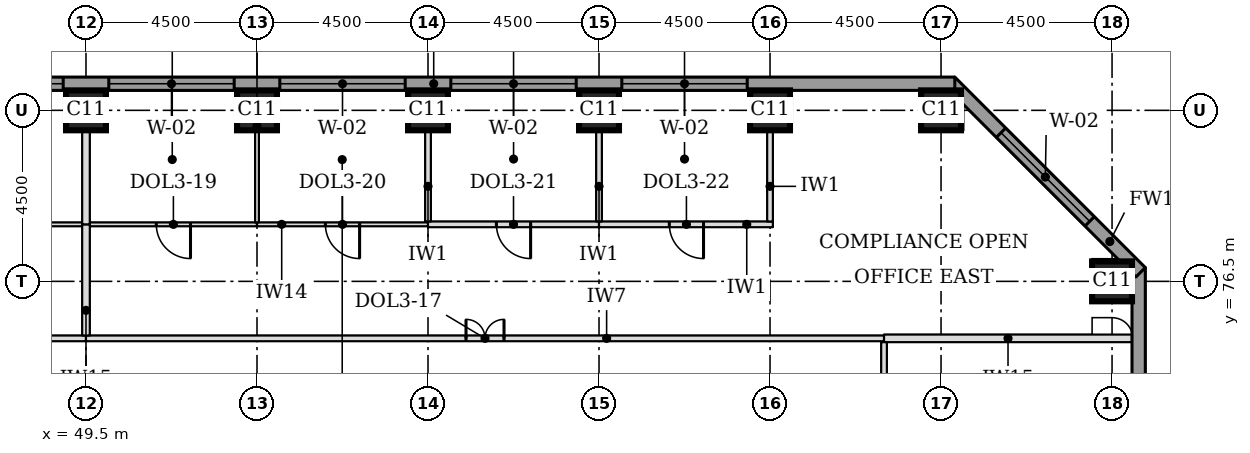
"""IFC4 building model, lengths in metres.
Left out: names, types, materials, properties, quantities, classifications, styles, units other than length and angle.
Written with IfcOpenShell. Run it as: python <this file> out.ifc"""

import sys

from ifc_helpers import new_model, si_unit, direction, frame, frame_2d, origin, origin_2d, place, context, subcontext, project, spatial, rectangle, extrude, element, fill, save


model = new_model("IFC4")
c1 = context("Model", 3, precision=1e-05, world=origin(), true_north=direction((0.0, 1.0)))
c2 = subcontext(c1, "Body", "Model", "MODEL_VIEW")
j1 = project(units=[si_unit("LENGTHUNIT", "METRE"), si_unit("PLANEANGLEUNIT", "RADIAN")], contexts=[c1])
p1 = place(None, origin())
s1 = spatial("IfcSite", under=j1, at=p1, CompositionType="ELEMENT")
p2 = place(p1, origin())
s2 = spatial("IfcBuilding", under=s1, at=p2, CompositionType="ELEMENT")
p3 = place(p2, frame((0.0, 0.0, 93.7)))
s3 = spatial("IfcBuildingStorey", under=s2, at=p3, CompositionType="ELEMENT", Elevation=93.7)
for number, where, z_axis, x_axis in (
    (1, (76.5, 76.5, 0.0), (0.0, 0.0, 1.0), (1.0, 0.0, 0.0)),
    (2, (49.5, 81.0, 0.0), (0.0, 0.0, 1.0), (1.0, 0.0, 0.0)),
    (3, (54.0, 81.0, 0.0), (0.0, 0.0, 1.0), (1.0, 0.0, 0.0)),
    (4, (58.5, 81.0, 0.0), (0.0, 0.0, 1.0), (1.0, 0.0, 0.0)),
    (5, (63.0, 81.0, 0.0), (0.0, 0.0, 1.0), (1.0, 0.0, 0.0)),
    (6, (67.5, 81.0, 0.0), (0.0, 0.0, 1.0), (1.0, 0.0, 0.0)),
    (7, (72.0, 81.0, 0.0), (0.0, 0.0, 1.0), (1.0, 0.0, 0.0)),
):
    element("IfcColumn", number, at=place(p3, frame(where, z_axis=z_axis, x_axis=x_axis)), inside=s3, PredefinedType="COLUMN", context=c2, shape_type="SweptSolid", body=[
        extrude(rectangle(XDim=1.05, YDim=1.05, at=origin_2d()), origin(), (0.0, 0.0, 1.0), 3.7),
    ])
p4 = place(p3, frame((77.2, 44.638, 0.0), z_axis=(0.0, 0.0, 1.0), x_axis=(0.0, 1.0, 0.0)))
e8 = element("IfcWall", 8, at=p4, inside=s3, PredefinedType="STANDARD", context=c2, shape_type="SweptSolid", body=[
    extrude(rectangle(XDim=32.225, YDim=0.35, at=frame_2d((16.112, 0.0))), origin(), (0.0, 0.0, 1.0), 3.525),
])
p5 = place(p4, frame((5.462, 0.0, 0.9)))
e9 = element("IfcOpeningElement", 9, at=p5, cuts=e8, PredefinedType="OPENING", context=c2, shape_type="SweptSolid", body=[
    extrude(rectangle(XDim=3.3, YDim=1.9, at=frame_2d((1.65, 0.95))), frame((0.0, 0.185, 0.0), z_axis=(0.0, -1.0, 0.0), x_axis=(1.0, 0.0, 0.0)), (0.0, 0.0, 1.0), 0.37),
])
p6 = place(p4, frame((9.962, 0.0, 0.9)))
e10 = element("IfcOpeningElement", 10, at=p6, cuts=e8, PredefinedType="OPENING", context=c2, shape_type="SweptSolid", body=[
    extrude(rectangle(XDim=3.3, YDim=1.9, at=frame_2d((1.65, 0.95))), frame((0.0, 0.185, 0.0), z_axis=(0.0, -1.0, 0.0), x_axis=(1.0, 0.0, 0.0)), (0.0, 0.0, 1.0), 0.37),
])
p7 = place(p4, frame((14.462, 0.0, 0.9)))
e11 = element("IfcOpeningElement", 11, at=p7, cuts=e8, PredefinedType="OPENING", context=c2, shape_type="SweptSolid", body=[
    extrude(rectangle(XDim=3.3, YDim=1.9, at=frame_2d((1.65, 0.95))), frame((0.0, 0.185, 0.0), z_axis=(0.0, -1.0, 0.0), x_axis=(1.0, 0.0, 0.0)), (0.0, 0.0, 1.0), 0.37),
])
p8 = place(p4, frame((18.962, 0.0, 0.9)))
e12 = element("IfcOpeningElement", 12, at=p8, cuts=e8, PredefinedType="OPENING", context=c2, shape_type="SweptSolid", body=[
    extrude(rectangle(XDim=3.3, YDim=1.9, at=frame_2d((1.65, 0.95))), frame((0.0, 0.185, 0.0), z_axis=(0.0, -1.0, 0.0), x_axis=(1.0, 0.0, 0.0)), (0.0, 0.0, 1.0), 0.37),
])
p9 = place(p4, frame((23.462, 0.0, 0.9)))
e13 = element("IfcOpeningElement", 13, at=p9, cuts=e8, PredefinedType="OPENING", context=c2, shape_type="SweptSolid", body=[
    extrude(rectangle(XDim=3.3, YDim=1.9, at=frame_2d((1.65, 0.95))), frame((0.0, 0.185, 0.0), z_axis=(0.0, -1.0, 0.0), x_axis=(1.0, 0.0, 0.0)), (0.0, 0.0, 1.0), 0.37),
])
p10 = place(p3, frame((77.251, 76.739, 0.0), z_axis=(0.0, 0.0, 1.0), x_axis=(-0.707106781187, 0.707106781187, 0.0)))
e14 = element("IfcWall", 14, at=p10, inside=s3, PredefinedType="STANDARD", context=c2, shape_type="SweptSolid", body=[
    extrude(rectangle(XDim=7.089, YDim=0.35, at=frame_2d((3.544, 0.0))), origin(), (0.0, 0.0, 1.0), 3.525),
])
p11 = place(p10, frame((1.894, 0.0, 0.9)))
e15 = element("IfcOpeningElement", 15, at=p11, cuts=e14, PredefinedType="OPENING", context=c2, shape_type="SweptSolid", body=[
    extrude(rectangle(XDim=3.3, YDim=1.9, at=frame_2d((1.65, 0.95))), frame((0.0, 0.185, 0.0), z_axis=(0.0, -1.0, 0.0), x_axis=(1.0, 0.0, 0.0)), (0.0, 0.0, 1.0), 0.37),
])
p12 = place(p3, frame((72.362, 81.7, 0.0), z_axis=(0.0, 0.0, 1.0), x_axis=(-1.0, 0.0, 0.0)))
e16 = element("IfcWall", 16, at=p12, inside=s3, PredefinedType="STANDARD", context=c2, shape_type="SweptSolid", body=[
    extrude(rectangle(XDim=32.225, YDim=0.35, at=frame_2d((16.112, 0.0))), origin(), (0.0, 0.0, 1.0), 3.525),
])
p13 = place(p12, frame((5.462, 0.0, 0.9)))
e17 = element("IfcOpeningElement", 17, at=p13, cuts=e16, PredefinedType="OPENING", context=c2, shape_type="SweptSolid", body=[
    extrude(rectangle(XDim=3.3, YDim=1.9, at=frame_2d((1.65, 0.95))), frame((0.0, 0.185, 0.0), z_axis=(0.0, -1.0, 0.0), x_axis=(1.0, 0.0, 0.0)), (0.0, 0.0, 1.0), 0.37),
])
p14 = place(p12, frame((9.962, 0.0, 0.9)))
e18 = element("IfcOpeningElement", 18, at=p14, cuts=e16, PredefinedType="OPENING", context=c2, shape_type="SweptSolid", body=[
    extrude(rectangle(XDim=3.3, YDim=1.9, at=frame_2d((1.65, 0.95))), frame((0.0, 0.185, 0.0), z_axis=(0.0, -1.0, 0.0), x_axis=(1.0, 0.0, 0.0)), (0.0, 0.0, 1.0), 0.37),
])
p15 = place(p12, frame((14.462, 0.0, 0.9)))
e19 = element("IfcOpeningElement", 19, at=p15, cuts=e16, PredefinedType="OPENING", context=c2, shape_type="SweptSolid", body=[
    extrude(rectangle(XDim=3.3, YDim=1.9, at=frame_2d((1.65, 0.95))), frame((0.0, 0.185, 0.0), z_axis=(0.0, -1.0, 0.0), x_axis=(1.0, 0.0, 0.0)), (0.0, 0.0, 1.0), 0.37),
])
p16 = place(p12, frame((18.962, 0.0, 0.9)))
e20 = element("IfcOpeningElement", 20, at=p16, cuts=e16, PredefinedType="OPENING", context=c2, shape_type="SweptSolid", body=[
    extrude(rectangle(XDim=3.3, YDim=1.9, at=frame_2d((1.65, 0.95))), frame((0.0, 0.185, 0.0), z_axis=(0.0, -1.0, 0.0), x_axis=(1.0, 0.0, 0.0)), (0.0, 0.0, 1.0), 0.37),
])
p17 = place(p12, frame((23.462, 0.0, 0.9)))
e21 = element("IfcOpeningElement", 21, at=p17, cuts=e16, PredefinedType="OPENING", context=c2, shape_type="SweptSolid", body=[
    extrude(rectangle(XDim=3.3, YDim=1.9, at=frame_2d((1.65, 0.95))), frame((0.0, 0.185, 0.0), z_axis=(0.0, -1.0, 0.0), x_axis=(1.0, 0.0, 0.0)), (0.0, 0.0, 1.0), 0.37),
])
p18 = place(p3, frame((42.075, 75.0, 0.0), z_axis=(0.0, 0.0, 1.0), x_axis=(1.0, 0.0, 0.0)))
e22 = element("IfcWall", 22, at=p18, inside=s3, PredefinedType="PARTITIONING", context=c2, shape_type="SweptSolid", body=[
    extrude(rectangle(XDim=7.425, YDim=0.15, at=frame_2d((3.712, 0.0))), origin(), (0.0, 0.0, 1.0), 3.55),
])
p19 = place(p18, frame((3.2, 0.0, 0.0)))
e23 = element("IfcOpeningElement", 23, at=p19, cuts=e22, PredefinedType="OPENING", context=c2, shape_type="SweptSolid", body=[
    extrude(rectangle(XDim=1.0, YDim=2.1, at=frame_2d((0.5, 1.05))), frame((0.0, 0.085, 0.0), z_axis=(0.0, -1.0, 0.0), x_axis=(1.0, 0.0, 0.0)), (0.0, 0.0, 1.0), 0.17),
])
p20 = place(p3, frame((49.5, 75.0, 0.0), z_axis=(0.0, 0.0, 1.0), x_axis=(1.0, 0.0, 0.0)))
e24 = element("IfcWall", 24, at=p20, inside=s3, PredefinedType="PARTITIONING", context=c2, shape_type="SweptSolid", body=[
    extrude(rectangle(XDim=21.0, YDim=0.15, at=frame_2d((10.5, 0.0))), origin(), (0.0, 0.0, 1.0), 3.55),
])
p21 = place(p20, frame((10.0, 0.0, 0.0)))
e25 = element("IfcOpeningElement", 25, at=p21, cuts=e24, PredefinedType="OPENING", context=c2, shape_type="SweptSolid", body=[
    extrude(rectangle(XDim=1.0, YDim=2.1, at=frame_2d((0.5, 1.05))), frame((0.0, 0.085, 0.0), z_axis=(0.0, -1.0, 0.0), x_axis=(1.0, 0.0, 0.0)), (0.0, 0.0, 1.0), 0.17),
])
p22 = place(p3, frame((70.5, 75.0, 0.0), z_axis=(0.0, 0.0, 1.0), x_axis=(1.0, 0.0, 0.0)))
e26 = element("IfcWall", 26, at=p22, inside=s3, PredefinedType="PARTITIONING", context=c2, shape_type="SweptSolid", body=[
    extrude(rectangle(XDim=6.525, YDim=0.2, at=frame_2d((3.262, 0.0))), origin(), (0.0, 0.0, 1.0), 3.55),
])
p23 = place(p3, frame((45.0, 78.0, 0.0), z_axis=(0.0, 0.0, 1.0), x_axis=(1.0, 0.0, 0.0)))
e27 = element("IfcWall", 27, at=p23, inside=s3, PredefinedType="PARTITIONING", context=c2, shape_type="SweptSolid", body=[
    extrude(rectangle(XDim=4.4, YDim=0.1, at=frame_2d((2.2, 0.0))), origin(), (0.0, 0.0, 1.0), 3.55),
])
p24 = place(p3, frame((49.6, 78.0, 0.0), z_axis=(0.0, 0.0, 1.0), x_axis=(1.0, 0.0, 0.0)))
e28 = element("IfcWall", 28, at=p24, inside=s3, PredefinedType="PARTITIONING", context=c2, shape_type="SweptSolid", body=[
    extrude(rectangle(XDim=4.4, YDim=0.1, at=frame_2d((2.2, 0.0))), origin(), (0.0, 0.0, 1.0), 3.55),
])
p25 = place(p24, frame((1.75, 0.0, 0.0)))
e29 = element("IfcOpeningElement", 29, at=p25, cuts=e28, PredefinedType="OPENING", context=c2, shape_type="SweptSolid", body=[
    extrude(rectangle(XDim=0.9, YDim=2.1, at=frame_2d((0.45, 1.05))), frame((0.0, 0.06, 0.0), z_axis=(0.0, -1.0, 0.0), x_axis=(1.0, 0.0, 0.0)), (0.0, 0.0, 1.0), 0.12),
])
p26 = place(p3, frame((54.0, 78.0, 0.0), z_axis=(0.0, 0.0, 1.0), x_axis=(1.0, 0.0, 0.0)))
e30 = element("IfcWall", 30, at=p26, inside=s3, PredefinedType="PARTITIONING", context=c2, shape_type="SweptSolid", body=[
    extrude(rectangle(XDim=4.5, YDim=0.1, at=frame_2d((2.25, 0.0))), origin(), (0.0, 0.0, 1.0), 3.55),
])
p27 = place(p26, frame((1.8, 0.0, 0.0)))
e31 = element("IfcOpeningElement", 31, at=p27, cuts=e30, PredefinedType="OPENING", context=c2, shape_type="SweptSolid", body=[
    extrude(rectangle(XDim=0.9, YDim=2.1, at=frame_2d((0.45, 1.05))), frame((0.0, 0.06, 0.0), z_axis=(0.0, -1.0, 0.0), x_axis=(1.0, 0.0, 0.0)), (0.0, 0.0, 1.0), 0.12),
])
p28 = place(p3, frame((58.5, 78.0, 0.0), z_axis=(0.0, 0.0, 1.0), x_axis=(1.0, 0.0, 0.0)))
e32 = element("IfcWall", 32, at=p28, inside=s3, PredefinedType="PARTITIONING", context=c2, shape_type="SweptSolid", body=[
    extrude(rectangle(XDim=4.5, YDim=0.15, at=frame_2d((2.25, 0.0))), origin(), (0.0, 0.0, 1.0), 3.55),
])
p29 = place(p28, frame((1.8, 0.0, 0.0)))
e33 = element("IfcOpeningElement", 33, at=p29, cuts=e32, PredefinedType="OPENING", context=c2, shape_type="SweptSolid", body=[
    extrude(rectangle(XDim=0.9, YDim=2.1, at=frame_2d((0.45, 1.05))), frame((0.0, 0.085, 0.0), z_axis=(0.0, -1.0, 0.0), x_axis=(1.0, 0.0, 0.0)), (0.0, 0.0, 1.0), 0.17),
])
p30 = place(p3, frame((63.0, 78.0, 0.0), z_axis=(0.0, 0.0, 1.0), x_axis=(1.0, 0.0, 0.0)))
e34 = element("IfcWall", 34, at=p30, inside=s3, PredefinedType="PARTITIONING", context=c2, shape_type="SweptSolid", body=[
    extrude(rectangle(XDim=4.575, YDim=0.15, at=frame_2d((2.288, 0.0))), origin(), (0.0, 0.0, 1.0), 3.55),
])
p31 = place(p30, frame((1.85, 0.0, 0.0)))
e35 = element("IfcOpeningElement", 35, at=p31, cuts=e34, PredefinedType="OPENING", context=c2, shape_type="SweptSolid", body=[
    extrude(rectangle(XDim=0.9, YDim=2.1, at=frame_2d((0.45, 1.05))), frame((0.0, 0.085, 0.0), z_axis=(0.0, -1.0, 0.0), x_axis=(1.0, 0.0, 0.0)), (0.0, 0.0, 1.0), 0.17),
])
p32 = place(p3, frame((70.5, 61.5, 0.0), z_axis=(0.0, 0.0, 1.0), x_axis=(0.0, 1.0, 0.0)))
e36 = element("IfcWall", 36, at=p32, inside=s3, PredefinedType="PARTITIONING", context=c2, shape_type="SweptSolid", body=[
    extrude(rectangle(XDim=13.4, YDim=0.15, at=frame_2d((6.7, 0.0))), origin(), (0.0, 0.0, 1.0), 3.55),
])
p33 = place(p32, frame((6.2, 0.0, 0.0)))
e37 = element("IfcOpeningElement", 37, at=p33, cuts=e36, PredefinedType="OPENING", context=c2, shape_type="SweptSolid", body=[
    extrude(rectangle(XDim=1.0, YDim=2.1, at=frame_2d((0.5, 1.05))), frame((0.0, 0.085, 0.0), z_axis=(0.0, -1.0, 0.0), x_axis=(1.0, 0.0, 0.0)), (0.0, 0.0, 1.0), 0.17),
])
p34 = place(p3, frame((49.5, 75.075, 0.0), z_axis=(0.0, 0.0, 1.0), x_axis=(0.0, 1.0, 0.0)))
e38 = element("IfcWall", 38, at=p34, inside=s3, PredefinedType="PARTITIONING", context=c2, shape_type="SweptSolid", body=[
    extrude(rectangle(XDim=2.925, YDim=0.2, at=frame_2d((1.462, 0.0))), origin(), (0.0, 0.0, 1.0), 3.55),
])
p35 = place(p3, frame((49.5, 78.0, 0.0), z_axis=(0.0, 0.0, 1.0), x_axis=(0.0, 1.0, 0.0)))
e39 = element("IfcWall", 39, at=p35, inside=s3, PredefinedType="PARTITIONING", context=c2, shape_type="SweptSolid", body=[
    extrude(rectangle(XDim=3.525, YDim=0.2, at=frame_2d((1.762, 0.0))), origin(), (0.0, 0.0, 1.0), 3.55),
])
p36 = place(p3, frame((54.0, 78.05, 0.0), z_axis=(0.0, 0.0, 1.0), x_axis=(0.0, 1.0, 0.0)))
e40 = element("IfcWall", 40, at=p36, inside=s3, PredefinedType="PARTITIONING", context=c2, shape_type="SweptSolid", body=[
    extrude(rectangle(XDim=3.475, YDim=0.1, at=frame_2d((1.737, 0.0))), origin(), (0.0, 0.0, 1.0), 3.55),
])
for number, where, z_axis, x_axis in (
    (41, (58.5, 78.075, 0.0), (0.0, 0.0, 1.0), (0.0, 1.0, 0.0)),
    (42, (63.0, 78.075, 0.0), (0.0, 0.0, 1.0), (0.0, 1.0, 0.0)),
    (43, (67.5, 78.075, 0.0), (0.0, 0.0, 1.0), (0.0, 1.0, 0.0)),
):
    element("IfcWall", number, at=place(p3, frame(where, z_axis=z_axis, x_axis=x_axis)), inside=s3, PredefinedType="PARTITIONING", context=c2, shape_type="SweptSolid", body=[
        extrude(rectangle(XDim=3.45, YDim=0.15, at=frame_2d((1.725, 0.0))), origin(), (0.0, 0.0, 1.0), 3.55),
    ])
p37 = place(p11, origin())
e44 = element("IfcWindow", 44, at=p37, inside=s3, PartitioningType="SINGLE_PANEL", PredefinedType="WINDOW", context=c2, shape_type="SweptSolid", body=[
    extrude(rectangle(XDim=3.3, YDim=1.9, at=frame_2d((1.65, 0.95))), frame((0.0, 0.085, 0.0), z_axis=(0.0, -1.0, 0.0), x_axis=(1.0, 0.0, 0.0)), (0.0, 0.0, 1.0), 0.06),
])
fill(e15, e44)
p38 = place(p13, origin())
e45 = element("IfcWindow", 45, at=p38, inside=s3, PartitioningType="SINGLE_PANEL", PredefinedType="WINDOW", context=c2, shape_type="SweptSolid", body=[
    extrude(rectangle(XDim=3.3, YDim=1.9, at=frame_2d((1.65, 0.95))), frame((0.0, 0.085, 0.0), z_axis=(0.0, -1.0, 0.0), x_axis=(1.0, 0.0, 0.0)), (0.0, 0.0, 1.0), 0.06),
])
fill(e17, e45)
p39 = place(p14, origin())
e46 = element("IfcWindow", 46, at=p39, inside=s3, PartitioningType="SINGLE_PANEL", PredefinedType="WINDOW", context=c2, shape_type="SweptSolid", body=[
    extrude(rectangle(XDim=3.3, YDim=1.9, at=frame_2d((1.65, 0.95))), frame((0.0, 0.085, 0.0), z_axis=(0.0, -1.0, 0.0), x_axis=(1.0, 0.0, 0.0)), (0.0, 0.0, 1.0), 0.06),
])
fill(e18, e46)
p40 = place(p15, origin())
e47 = element("IfcWindow", 47, at=p40, inside=s3, PartitioningType="SINGLE_PANEL", PredefinedType="WINDOW", context=c2, shape_type="SweptSolid", body=[
    extrude(rectangle(XDim=3.3, YDim=1.9, at=frame_2d((1.65, 0.95))), frame((0.0, 0.085, 0.0), z_axis=(0.0, -1.0, 0.0), x_axis=(1.0, 0.0, 0.0)), (0.0, 0.0, 1.0), 0.06),
])
fill(e19, e47)
p41 = place(p16, origin())
e48 = element("IfcWindow", 48, at=p41, inside=s3, PartitioningType="SINGLE_PANEL", PredefinedType="WINDOW", context=c2, shape_type="SweptSolid", body=[
    extrude(rectangle(XDim=3.3, YDim=1.9, at=frame_2d((1.65, 0.95))), frame((0.0, 0.085, 0.0), z_axis=(0.0, -1.0, 0.0), x_axis=(1.0, 0.0, 0.0)), (0.0, 0.0, 1.0), 0.06),
])
fill(e20, e48)
p42 = place(p17, origin())
e49 = element("IfcWindow", 49, at=p42, inside=s3, PartitioningType="SINGLE_PANEL", PredefinedType="WINDOW", context=c2, shape_type="SweptSolid", body=[
    extrude(rectangle(XDim=3.3, YDim=1.9, at=frame_2d((1.65, 0.95))), frame((0.0, 0.085, 0.0), z_axis=(0.0, -1.0, 0.0), x_axis=(1.0, 0.0, 0.0)), (0.0, 0.0, 1.0), 0.06),
])
fill(e21, e49)
p43 = place(p21, origin())
e50 = element("IfcDoor", 50, at=p43, inside=s3, OperationType="DOUBLE_DOOR_SINGLE_SWING", PredefinedType="DOOR", context=c2, shape_type="SweptSolid", body=[
    extrude(rectangle(XDim=1.0, YDim=2.1, at=frame_2d((0.5, 1.05))), frame((0.0, 0.025, 0.0), z_axis=(0.0, -1.0, 0.0), x_axis=(1.0, 0.0, 0.0)), (0.0, 0.0, 1.0), 0.05),
])
fill(e25, e50)
p44 = place(p25, frame((0.9, 0.0, 0.0), z_axis=(0.0, 0.0, 1.0), x_axis=(-1.0, 0.0, 0.0)))
e51 = element("IfcDoor", 51, at=p44, inside=s3, OperationType="SINGLE_SWING_LEFT", PredefinedType="DOOR", context=c2, shape_type="SweptSolid", body=[
    extrude(rectangle(XDim=0.9, YDim=2.1, at=frame_2d((0.45, 1.05))), frame((0.0, 0.025, 0.0), z_axis=(0.0, -1.0, 0.0), x_axis=(1.0, 0.0, 0.0)), (0.0, 0.0, 1.0), 0.05),
])
fill(e29, e51)
p45 = place(p27, frame((0.9, 0.0, 0.0), z_axis=(0.0, 0.0, 1.0), x_axis=(-1.0, 0.0, 0.0)))
e52 = element("IfcDoor", 52, at=p45, inside=s3, OperationType="SINGLE_SWING_LEFT", PredefinedType="DOOR", context=c2, shape_type="SweptSolid", body=[
    extrude(rectangle(XDim=0.9, YDim=2.1, at=frame_2d((0.45, 1.05))), frame((0.0, 0.025, 0.0), z_axis=(0.0, -1.0, 0.0), x_axis=(1.0, 0.0, 0.0)), (0.0, 0.0, 1.0), 0.05),
])
fill(e31, e52)
p46 = place(p29, frame((0.9, 0.0, 0.0), z_axis=(0.0, 0.0, 1.0), x_axis=(-1.0, 0.0, 0.0)))
e53 = element("IfcDoor", 53, at=p46, inside=s3, OperationType="SINGLE_SWING_LEFT", PredefinedType="DOOR", context=c2, shape_type="SweptSolid", body=[
    extrude(rectangle(XDim=0.9, YDim=2.1, at=frame_2d((0.45, 1.05))), frame((0.0, 0.025, 0.0), z_axis=(0.0, -1.0, 0.0), x_axis=(1.0, 0.0, 0.0)), (0.0, 0.0, 1.0), 0.05),
])
fill(e33, e53)
p47 = place(p31, frame((0.9, 0.0, 0.0), z_axis=(0.0, 0.0, 1.0), x_axis=(-1.0, 0.0, 0.0)))
e54 = element("IfcDoor", 54, at=p47, inside=s3, OperationType="SINGLE_SWING_LEFT", PredefinedType="DOOR", context=c2, shape_type="SweptSolid", body=[
    extrude(rectangle(XDim=0.9, YDim=2.1, at=frame_2d((0.45, 1.05))), frame((0.0, 0.025, 0.0), z_axis=(0.0, -1.0, 0.0), x_axis=(1.0, 0.0, 0.0)), (0.0, 0.0, 1.0), 0.05),
])
fill(e35, e54)
save(model, sys.argv[1])
